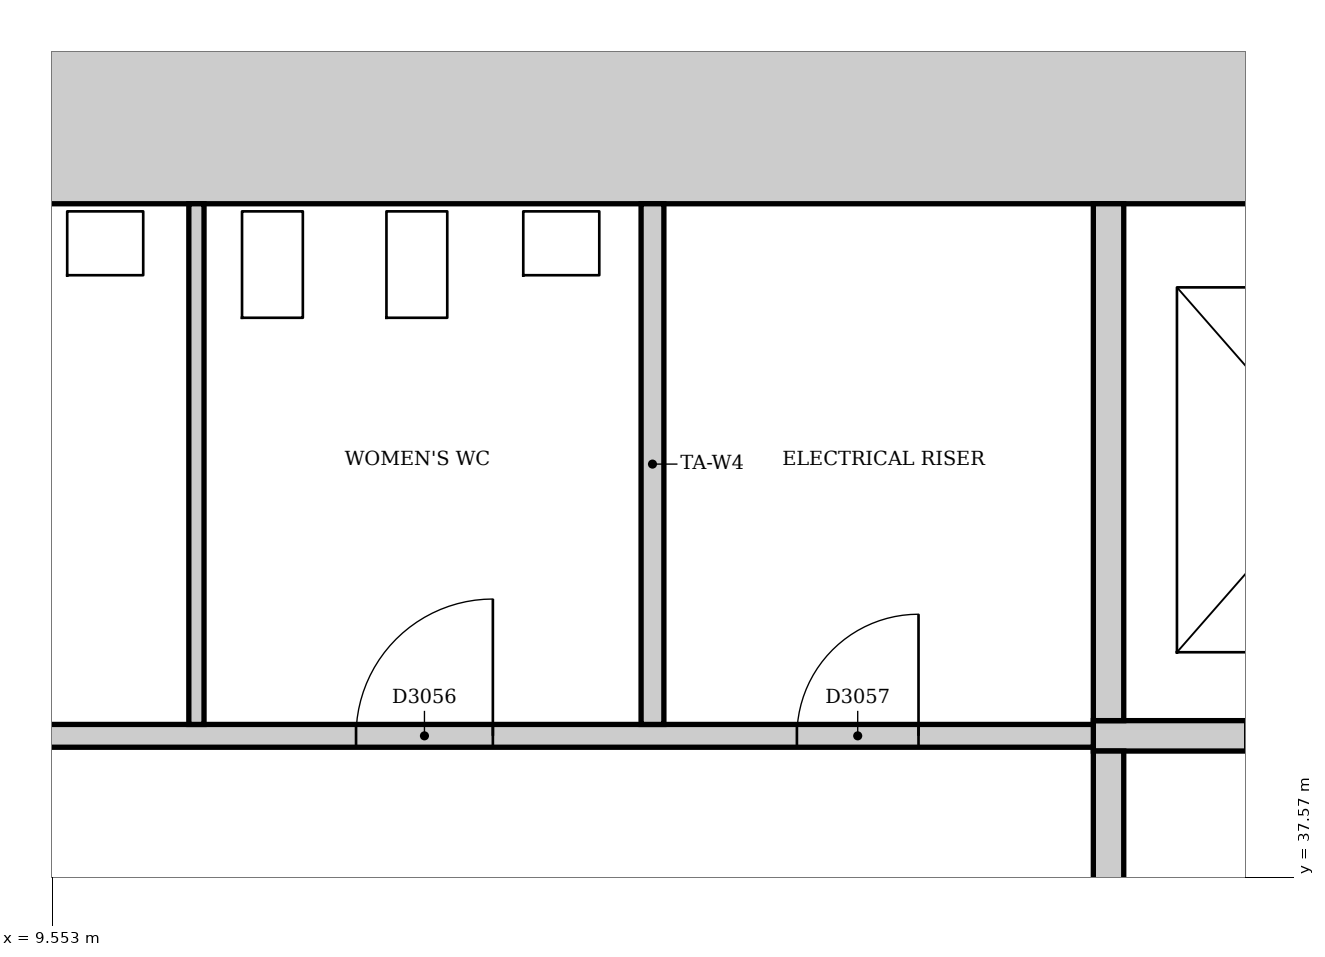
"""IFC4 building model, lengths in metres.
Left out: names, types, materials, properties, quantities, classifications, styles, units other than length and angle.
Written with IfcOpenShell. Run it as: python <this file> out.ifc"""

import sys

from ifc_helpers import new_model, si_unit, direction, frame, frame_2d, origin, place, context, subcontext, project, spatial, rectangle, extrude, element, fill, save


model = new_model("IFC4")
c1 = context("Model", 3, precision=1e-05, world=origin(), true_north=direction((0.0, 1.0)))
c2 = subcontext(c1, "Body", "Model", "MODEL_VIEW")
j1 = project(units=[si_unit("LENGTHUNIT", "METRE"), si_unit("PLANEANGLEUNIT", "RADIAN")], contexts=[c1])
p1 = place(None, origin())
s1 = spatial("IfcSite", under=j1, at=p1, CompositionType="ELEMENT")
p2 = place(p1, origin())
s2 = spatial("IfcBuilding", under=s1, at=p2, CompositionType="ELEMENT")
p3 = place(p2, frame((0.0, 0.0, -5.0)))
s3 = spatial("IfcBuildingStorey", under=s2, at=p3, CompositionType="ELEMENT", Elevation=-5.0)
p4 = place(p3, frame((23.7, 42.6, 0.0), z_axis=(0.0, 0.0, 1.0), x_axis=(-1.0, 0.0, 0.0)))
e1 = element("IfcWall", 1, at=p4, inside=s3, PredefinedType="SOLIDWALL", context=c2, shape_type="SweptSolid", body=[
    extrude(rectangle(XDim=19.8, YDim=1.2, at=frame_2d((9.9, 0.0))), origin(), (0.0, 0.0, 1.0), 5.0),
])
p5 = place(p3, frame((16.4, 38.5, 0.0), z_axis=(0.0, 0.0, 1.0), x_axis=(1.0, 0.0, 0.0)))
e2 = element("IfcWall", 2, at=p5, inside=s3, PredefinedType="PARTITIONING", context=c2, shape_type="SweptSolid", body=[
    extrude(rectangle(XDim=6.1, YDim=0.2, at=frame_2d((3.05, 0.0))), origin(), (0.0, 0.0, 1.0), 4.7),
])
p6 = place(p5, frame((1.0, 0.0, 0.0)))
e3 = element("IfcOpeningElement", 3, at=p6, cuts=e2, PredefinedType="OPENING", context=c2, shape_type="SweptSolid", body=[
    extrude(rectangle(XDim=1.2, YDim=2.1, at=frame_2d((0.6, 1.05))), frame((0.0, 0.11, 0.0), z_axis=(0.0, -1.0, 0.0), x_axis=(1.0, 0.0, 0.0)), (0.0, 0.0, 1.0), 0.22),
])
p7 = place(p5, frame((4.0, 0.0, 0.0)))
e4 = element("IfcOpeningElement", 4, at=p7, cuts=e2, PredefinedType="OPENING", context=c2, shape_type="SweptSolid", body=[
    extrude(rectangle(XDim=1.2, YDim=2.1, at=frame_2d((0.6, 1.05))), frame((0.0, 0.11, 0.0), z_axis=(0.0, -1.0, 0.0), x_axis=(1.0, 0.0, 0.0)), (0.0, 0.0, 1.0), 0.22),
])
p8 = place(p3, frame((16.5, 35.85, 0.0), z_axis=(0.0, 0.0, 1.0), x_axis=(0.0, 1.0, 0.0)))
e5 = element("IfcWall", 5, at=p8, inside=s3, PredefinedType="PARTITIONING", context=c2, shape_type="SweptSolid", body=[
    extrude(rectangle(XDim=2.55, YDim=0.2, at=frame_2d((1.275, 0.0))), origin(), (0.0, 0.0, 1.0), 4.7),
])
p9 = place(p3, frame((16.5, 38.6, 0.0), z_axis=(0.0, 0.0, 1.0), x_axis=(0.0, 1.0, 0.0)))
e6 = element("IfcWall", 6, at=p9, inside=s3, PredefinedType="PARTITIONING", context=c2, shape_type="SweptSolid", body=[
    extrude(rectangle(XDim=3.4, YDim=0.2, at=frame_2d((1.7, 0.0))), origin(), (0.0, 0.0, 1.0), 4.7),
])
p10 = place(p3, frame((4.5, 38.5, 0.0), z_axis=(0.0, 0.0, 1.0), x_axis=(1.0, 0.0, 0.0)))
e7 = element("IfcWall", 7, at=p10, inside=s3, PredefinedType="PARTITIONING", context=c2, shape_type="SweptSolid", body=[
    extrude(rectangle(XDim=11.9, YDim=0.15, at=frame_2d((5.95, 0.0))), origin(), (0.0, 0.0, 1.0), 4.7),
])
p11 = place(p10, frame((1.1, 0.0, 0.0)))
e8 = element("IfcOpeningElement", 8, at=p11, cuts=e7, PredefinedType="OPENING", context=c2, shape_type="SweptSolid", body=[
    extrude(rectangle(XDim=0.9, YDim=2.1, at=frame_2d((0.45, 1.05))), frame((0.0, 0.085, 0.0), z_axis=(0.0, -1.0, 0.0), x_axis=(1.0, 0.0, 0.0)), (0.0, 0.0, 1.0), 0.17),
])
p12 = place(p10, frame((4.05, 0.0, 0.0)))
e9 = element("IfcOpeningElement", 9, at=p12, cuts=e7, PredefinedType="OPENING", context=c2, shape_type="SweptSolid", body=[
    extrude(rectangle(XDim=0.9, YDim=2.1, at=frame_2d((0.45, 1.05))), frame((0.0, 0.085, 0.0), z_axis=(0.0, -1.0, 0.0), x_axis=(1.0, 0.0, 0.0)), (0.0, 0.0, 1.0), 0.17),
])
p13 = place(p10, frame((7.05, 0.0, 0.0)))
e10 = element("IfcOpeningElement", 10, at=p13, cuts=e7, PredefinedType="OPENING", context=c2, shape_type="SweptSolid", body=[
    extrude(rectangle(XDim=0.9, YDim=2.1, at=frame_2d((0.45, 1.05))), frame((0.0, 0.085, 0.0), z_axis=(0.0, -1.0, 0.0), x_axis=(1.0, 0.0, 0.0)), (0.0, 0.0, 1.0), 0.17),
])
p14 = place(p10, frame((9.95, 0.0, 0.0)))
e11 = element("IfcOpeningElement", 11, at=p14, cuts=e7, PredefinedType="OPENING", context=c2, shape_type="SweptSolid", body=[
    extrude(rectangle(XDim=0.8, YDim=2.1, at=frame_2d((0.4, 1.05))), frame((0.0, 0.085, 0.0), z_axis=(0.0, -1.0, 0.0), x_axis=(1.0, 0.0, 0.0)), (0.0, 0.0, 1.0), 0.17),
])
p15 = place(p3, frame((13.5, 38.575, 0.0), z_axis=(0.0, 0.0, 1.0), x_axis=(0.0, 1.0, 0.0)))
e12 = element("IfcWall", 12, at=p15, inside=s3, PredefinedType="PARTITIONING", context=c2, shape_type="SweptSolid", body=[
    extrude(rectangle(XDim=3.425, YDim=0.15, at=frame_2d((1.712, 0.0))), origin(), (0.0, 0.0, 1.0), 4.7),
])
p16 = place(p3, frame((10.5, 38.575, 0.0), z_axis=(0.0, 0.0, 1.0), x_axis=(0.0, 1.0, 0.0)))
e13 = element("IfcWall", 13, at=p16, inside=s3, PredefinedType="PARTITIONING", context=c2, shape_type="SweptSolid", body=[
    extrude(rectangle(XDim=3.425, YDim=0.1, at=frame_2d((1.712, 0.0))), origin(), (0.0, 0.0, 1.0), 4.7),
])
p17 = place(p13, origin())
e14 = element("IfcDoor", 14, at=p17, inside=s3, OperationType="SINGLE_SWING_RIGHT", PredefinedType="DOOR", context=c2, shape_type="SweptSolid", body=[
    extrude(rectangle(XDim=0.9, YDim=2.1, at=frame_2d((0.45, 1.05))), frame((0.0, 0.025, 0.0), z_axis=(0.0, -1.0, 0.0), x_axis=(1.0, 0.0, 0.0)), (0.0, 0.0, 1.0), 0.05),
])
fill(e10, e14)
p18 = place(p14, origin())
e15 = element("IfcDoor", 15, at=p18, inside=s3, OperationType="SINGLE_SWING_RIGHT", PredefinedType="DOOR", context=c2, shape_type="SweptSolid", body=[
    extrude(rectangle(XDim=0.8, YDim=2.1, at=frame_2d((0.4, 1.05))), frame((0.0, 0.025, 0.0), z_axis=(0.0, -1.0, 0.0), x_axis=(1.0, 0.0, 0.0)), (0.0, 0.0, 1.0), 0.05),
])
fill(e11, e15)
save(model, sys.argv[1])
